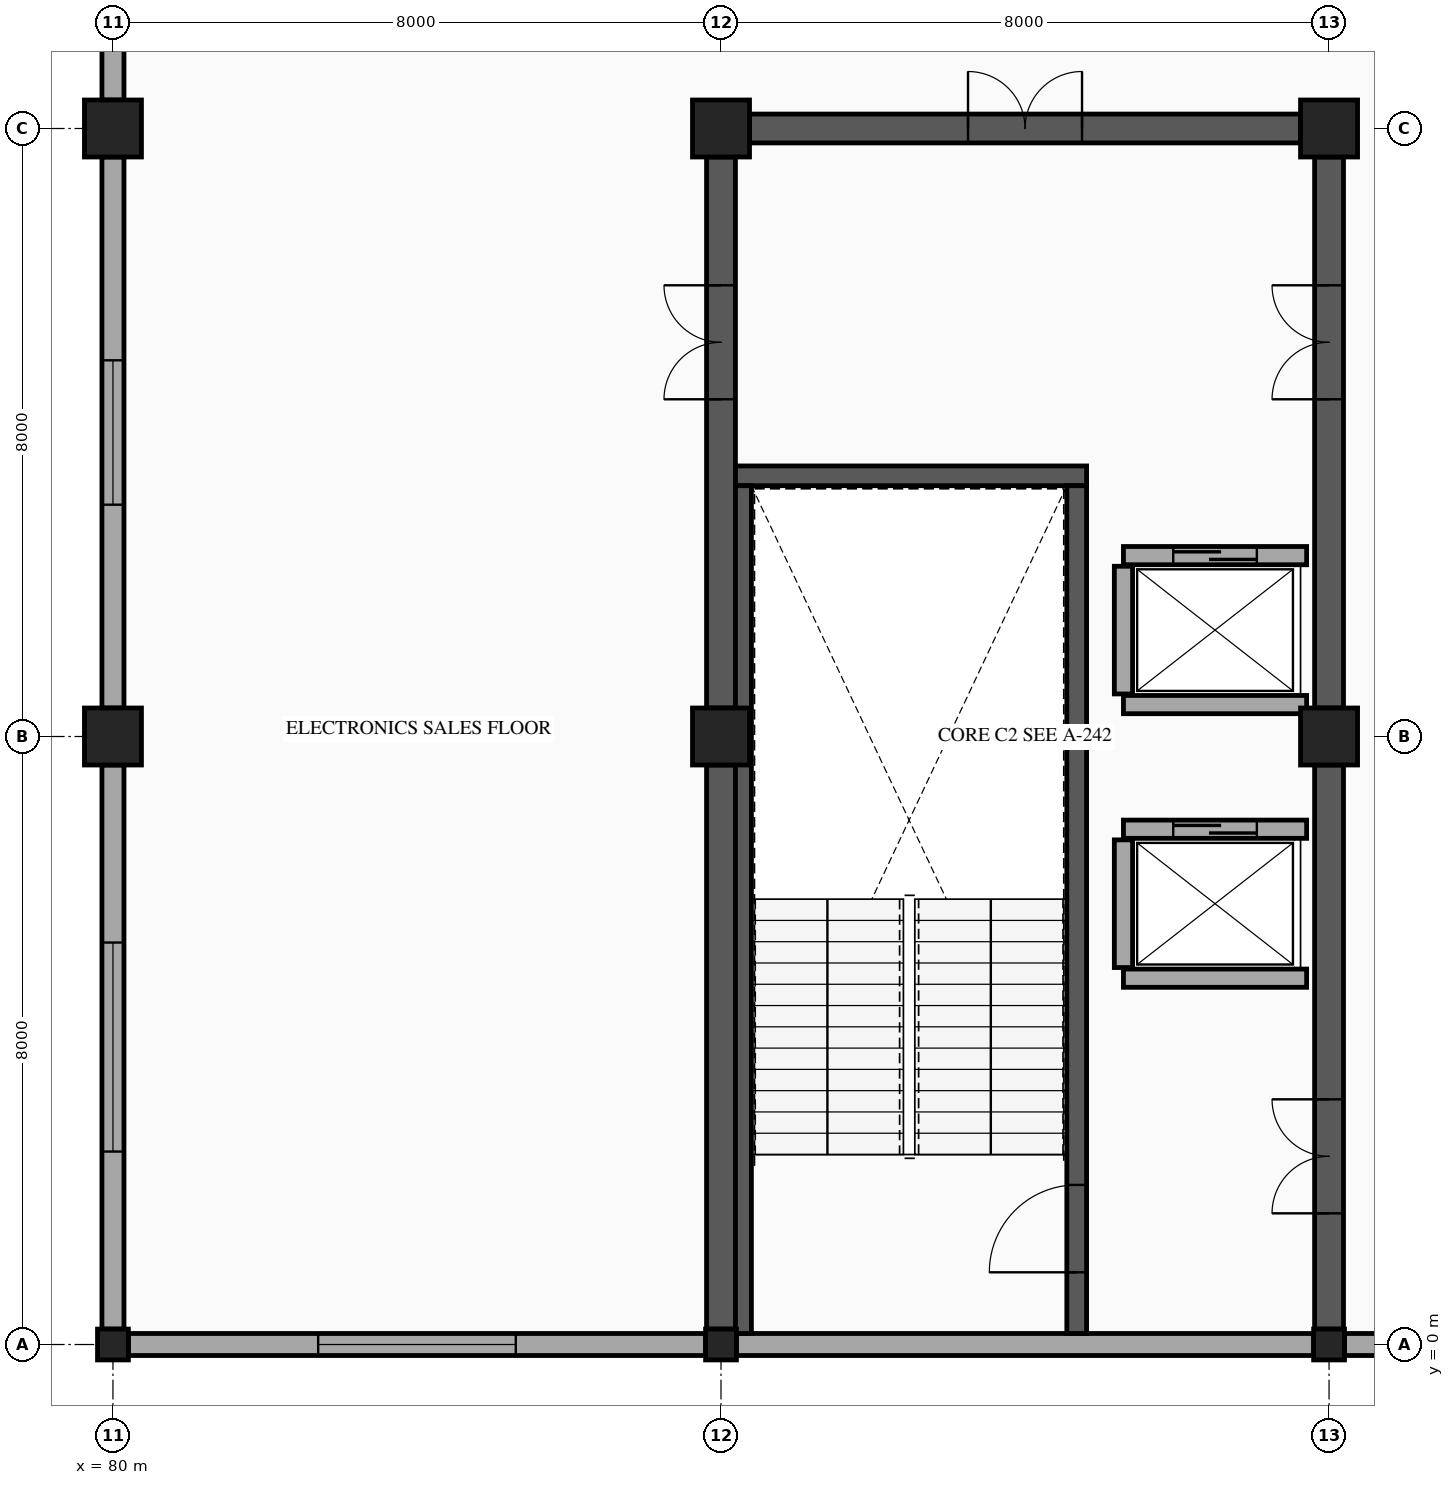
"""IFC4 building model, lengths in metres.
Left out: names, types, materials, properties, quantities, classifications, styles, units other than length and angle.
Written with IfcOpenShell. Run it as: python <this file> out.ifc"""

import sys

from ifc_helpers import new_model, si_unit, direction, frame, frame_2d, origin, origin_2d, place, context, subcontext, project, spatial, rectangle, hollow_rectangle, extrude, element, fill, save


model = new_model("IFC4")
c1 = context("Model", 3, precision=1e-05, world=origin(), true_north=direction((0.0, 1.0)))
c2 = subcontext(c1, "Body", "Model", "MODEL_VIEW")
j1 = project(units=[si_unit("LENGTHUNIT", "METRE"), si_unit("PLANEANGLEUNIT", "RADIAN")], contexts=[c1])
p1 = place(None, origin())
s1 = spatial("IfcSite", under=j1, at=p1, CompositionType="ELEMENT")
p2 = place(p1, origin())
s2 = spatial("IfcBuilding", under=s1, at=p2, CompositionType="ELEMENT")
p3 = place(p2, frame((0.0, 0.0, 23.9)))
s3 = spatial("IfcBuildingStorey", under=s2, at=p3, CompositionType="ELEMENT", Elevation=23.9)
p4 = place(p3, frame((80.0, 0.0, 0.0), z_axis=(0.0, 0.0, 1.0), x_axis=(1.0, 0.0, 0.0)))
e1 = element("IfcColumn", 1, at=p4, inside=s3, PredefinedType="COLUMN", context=c2, shape_type="SweptSolid", body=[
    extrude(hollow_rectangle(XDim=0.406, YDim=0.406, WallThickness=0.015, InnerFilletRadius=0.015, OuterFilletRadius=0.029, at=origin_2d()), origin(), (0.0, 0.0, 1.0), 4.5),
])
for number, where, z_axis, x_axis in (
    (2, (80.0, 8.0, 0.0), (0.0, 0.0, 1.0), (1.0, 0.0, 0.0)),
    (3, (80.0, 16.0, 0.0), (0.0, 0.0, 1.0), (1.0, 0.0, 0.0)),
):
    element("IfcColumn", number, at=place(p3, frame(where, z_axis=z_axis, x_axis=x_axis)), inside=s3, PredefinedType="COLUMN", context=c2, shape_type="SweptSolid", body=[
        extrude(rectangle(XDim=0.75, YDim=0.75, at=origin_2d()), origin(), (0.0, 0.0, 1.0), 4.5),
    ])
p5 = place(p3, frame((88.0, 0.0, 0.0), z_axis=(0.0, 0.0, 1.0), x_axis=(1.0, 0.0, 0.0)))
e4 = element("IfcColumn", 4, at=p5, inside=s3, PredefinedType="COLUMN", context=c2, shape_type="SweptSolid", body=[
    extrude(hollow_rectangle(XDim=0.406, YDim=0.406, WallThickness=0.015, InnerFilletRadius=0.015, OuterFilletRadius=0.029, at=origin_2d()), origin(), (0.0, 0.0, 1.0), 4.5),
])
for number, where, z_axis, x_axis in (
    (5, (88.0, 8.0, 0.0), (0.0, 0.0, 1.0), (1.0, 0.0, 0.0)),
    (6, (88.0, 16.0, 0.0), (0.0, 0.0, 1.0), (1.0, 0.0, 0.0)),
):
    element("IfcColumn", number, at=place(p3, frame(where, z_axis=z_axis, x_axis=x_axis)), inside=s3, PredefinedType="COLUMN", context=c2, shape_type="SweptSolid", body=[
        extrude(rectangle(XDim=0.75, YDim=0.75, at=origin_2d()), origin(), (0.0, 0.0, 1.0), 4.5),
    ])
p6 = place(p3, frame((96.0, 0.0, 0.0), z_axis=(0.0, 0.0, 1.0), x_axis=(1.0, 0.0, 0.0)))
e7 = element("IfcColumn", 7, at=p6, inside=s3, PredefinedType="COLUMN", context=c2, shape_type="SweptSolid", body=[
    extrude(hollow_rectangle(XDim=0.406, YDim=0.406, WallThickness=0.015, InnerFilletRadius=0.015, OuterFilletRadius=0.029, at=origin_2d()), origin(), (0.0, 0.0, 1.0), 4.5),
])
for number, where, z_axis, x_axis in (
    (8, (96.0, 8.0, 0.0), (0.0, 0.0, 1.0), (1.0, 0.0, 0.0)),
    (9, (96.0, 16.0, 0.0), (0.0, 0.0, 1.0), (1.0, 0.0, 0.0)),
):
    element("IfcColumn", number, at=place(p3, frame(where, z_axis=z_axis, x_axis=x_axis)), inside=s3, PredefinedType="COLUMN", context=c2, shape_type="SweptSolid", body=[
        extrude(rectangle(XDim=0.75, YDim=0.75, at=origin_2d()), origin(), (0.0, 0.0, 1.0), 4.5),
    ])
p7 = place(p3, frame((103.797, 0.0, 0.0), z_axis=(0.0, 0.0, 1.0), x_axis=(-1.0, 0.0, 0.0)))
e10 = element("IfcWall", 10, at=p7, inside=s3, PredefinedType="STANDARD", context=c2, shape_type="SweptSolid", body=[
    extrude(rectangle(XDim=7.594, YDim=0.29, at=frame_2d((3.797, 0.0))), origin(), (0.0, 0.0, 1.0), 3.48),
])
p8 = place(p7, frame((2.497, 0.0, 0.8)))
e11 = element("IfcOpeningElement", 11, at=p8, cuts=e10, PredefinedType="OPENING", context=c2, shape_type="SweptSolid", body=[
    extrude(rectangle(XDim=2.6, YDim=1.3, at=frame_2d((1.3, 0.65))), frame((0.0, 0.155, 0.0), z_axis=(0.0, -1.0, 0.0), x_axis=(1.0, 0.0, 0.0)), (0.0, 0.0, 1.0), 0.31),
])
p9 = place(p3, frame((95.797, 0.0, 0.0), z_axis=(0.0, 0.0, 1.0), x_axis=(-1.0, 0.0, 0.0)))
e12 = element("IfcWall", 12, at=p9, inside=s3, PredefinedType="STANDARD", context=c2, shape_type="SweptSolid", body=[
    extrude(rectangle(XDim=7.594, YDim=0.29, at=frame_2d((3.797, 0.0))), origin(), (0.0, 0.0, 1.0), 3.48),
])
p10 = place(p3, frame((87.797, 0.0, 0.0), z_axis=(0.0, 0.0, 1.0), x_axis=(-1.0, 0.0, 0.0)))
e13 = element("IfcWall", 13, at=p10, inside=s3, PredefinedType="STANDARD", context=c2, shape_type="SweptSolid", body=[
    extrude(rectangle(XDim=7.594, YDim=0.29, at=frame_2d((3.797, 0.0))), origin(), (0.0, 0.0, 1.0), 3.48),
])
p11 = place(p10, frame((2.497, 0.0, 0.8)))
e14 = element("IfcOpeningElement", 14, at=p11, cuts=e13, PredefinedType="OPENING", context=c2, shape_type="SweptSolid", body=[
    extrude(rectangle(XDim=2.6, YDim=1.3, at=frame_2d((1.3, 0.65))), frame((0.0, 0.155, 0.0), z_axis=(0.0, -1.0, 0.0), x_axis=(1.0, 0.0, 0.0)), (0.0, 0.0, 1.0), 0.31),
])
p12 = place(p3, frame((80.0, 0.203, 0.0), z_axis=(0.0, 0.0, 1.0), x_axis=(0.0, 1.0, 0.0)))
e15 = element("IfcWall", 15, at=p12, inside=s3, PredefinedType="STANDARD", context=c2, shape_type="SweptSolid", body=[
    extrude(rectangle(XDim=7.422, YDim=0.29, at=frame_2d((3.711, 0.0))), origin(), (0.0, 0.0, 1.0), 3.48),
])
p13 = place(p12, frame((2.336, 0.0, 0.8)))
e16 = element("IfcOpeningElement", 16, at=p13, cuts=e15, PredefinedType="OPENING", context=c2, shape_type="SweptSolid", body=[
    extrude(rectangle(XDim=2.75, YDim=2.15, at=frame_2d((1.375, 1.075))), frame((0.0, 0.155, 0.0), z_axis=(0.0, -1.0, 0.0), x_axis=(1.0, 0.0, 0.0)), (0.0, 0.0, 1.0), 0.31),
])
p14 = place(p3, frame((80.0, 8.375, 0.0), z_axis=(0.0, 0.0, 1.0), x_axis=(0.0, 1.0, 0.0)))
e17 = element("IfcWall", 17, at=p14, inside=s3, PredefinedType="STANDARD", context=c2, shape_type="SweptSolid", body=[
    extrude(rectangle(XDim=7.25, YDim=0.29, at=frame_2d((3.625, 0.0))), origin(), (0.0, 0.0, 1.0), 3.48),
])
p15 = place(p14, frame((2.675, 0.0, 0.8)))
e18 = element("IfcOpeningElement", 18, at=p15, cuts=e17, PredefinedType="OPENING", context=c2, shape_type="SweptSolid", body=[
    extrude(rectangle(XDim=1.9, YDim=1.65, at=frame_2d((0.95, 0.825))), frame((0.0, 0.155, 0.0), z_axis=(0.0, -1.0, 0.0), x_axis=(1.0, 0.0, 0.0)), (0.0, 0.0, 1.0), 0.31),
])
p16 = place(p3, frame((80.0, 16.375, 0.0), z_axis=(0.0, 0.0, 1.0), x_axis=(0.0, 1.0, 0.0)))
e19 = element("IfcWall", 19, at=p16, inside=s3, PredefinedType="STANDARD", context=c2, shape_type="SweptSolid", body=[
    extrude(rectangle(XDim=7.3, YDim=0.29, at=frame_2d((3.65, 0.0))), origin(), (0.0, 0.0, 1.0), 3.48),
])
p17 = place(p3, frame((88.14, 11.43, 0.0), z_axis=(0.0, 0.0, 1.0), x_axis=(1.0, 0.0, 0.0)))
e20 = element("IfcWall", 20, at=p17, inside=s3, PredefinedType="SHEAR", context=c2, shape_type="SweptSolid", body=[
    extrude(rectangle(XDim=4.67, YDim=0.26, at=frame_2d((2.335, 0.0))), origin(), (0.0, 0.0, 1.0), 4.28),
])
p18 = place(p3, frame((88.27, 0.145, 0.0), z_axis=(0.0, 0.0, 1.0), x_axis=(0.0, 1.0, 0.0)))
e21 = element("IfcWall", 21, at=p18, inside=s3, PredefinedType="SHEAR", context=c2, shape_type="SweptSolid", body=[
    extrude(rectangle(XDim=11.155, YDim=0.26, at=frame_2d((5.578, 0.0))), origin(), (0.0, 0.0, 1.0), 4.28),
])
p19 = place(p3, frame((92.68, 0.145, 0.0), z_axis=(0.0, 0.0, 1.0), x_axis=(0.0, 1.0, 0.0)))
e22 = element("IfcWall", 22, at=p19, inside=s3, PredefinedType="SHEAR", context=c2, shape_type="SweptSolid", body=[
    extrude(rectangle(XDim=11.155, YDim=0.26, at=frame_2d((5.578, 0.0))), origin(), (0.0, 0.0, 1.0), 4.28),
])
p20 = place(p19, frame((0.805, 0.0, 0.0)))
e23 = element("IfcOpeningElement", 23, at=p20, cuts=e22, PredefinedType="OPENING", context=c2, shape_type="SweptSolid", body=[
    extrude(rectangle(XDim=1.15, YDim=2.15, at=frame_2d((0.575, 1.075))), frame((0.0, 0.14, 0.0), z_axis=(0.0, -1.0, 0.0), x_axis=(1.0, 0.0, 0.0)), (0.0, 0.0, 1.0), 0.28),
])
p21 = place(p3, frame((88.375, 16.0, 0.0), z_axis=(0.0, 0.0, 1.0), x_axis=(1.0, 0.0, 0.0)))
e24 = element("IfcWall", 24, at=p21, inside=s3, PredefinedType="SHEAR", context=c2, shape_type="SweptSolid", body=[
    extrude(rectangle(XDim=7.25, YDim=0.38, at=frame_2d((3.625, 0.0))), origin(), (0.0, 0.0, 1.0), 4.28),
])
p22 = place(p21, frame((2.875, 0.0, 0.0)))
e25 = element("IfcOpeningElement", 25, at=p22, cuts=e24, PredefinedType="OPENING", context=c2, shape_type="SweptSolid", body=[
    extrude(rectangle(XDim=1.5, YDim=2.15, at=frame_2d((0.75, 1.075))), frame((0.0, 0.2, 0.0), z_axis=(0.0, -1.0, 0.0), x_axis=(1.0, 0.0, 0.0)), (0.0, 0.0, 1.0), 0.4),
])
p23 = place(p3, frame((88.0, 0.203, 0.0), z_axis=(0.0, 0.0, 1.0), x_axis=(0.0, 1.0, 0.0)))
e26 = element("IfcWall", 26, at=p23, inside=s3, PredefinedType="SHEAR", context=c2, shape_type="SweptSolid", body=[
    extrude(rectangle(XDim=7.422, YDim=0.38, at=frame_2d((3.711, 0.0))), origin(), (0.0, 0.0, 1.0), 4.28),
])
p24 = place(p3, frame((88.0, 8.375, 0.0), z_axis=(0.0, 0.0, 1.0), x_axis=(0.0, 1.0, 0.0)))
e27 = element("IfcWall", 27, at=p24, inside=s3, PredefinedType="SHEAR", context=c2, shape_type="SweptSolid", body=[
    extrude(rectangle(XDim=7.25, YDim=0.38, at=frame_2d((3.625, 0.0))), origin(), (0.0, 0.0, 1.0), 4.28),
])
p25 = place(p24, frame((4.062, 0.0, 0.0)))
e28 = element("IfcOpeningElement", 28, at=p25, cuts=e27, PredefinedType="OPENING", context=c2, shape_type="SweptSolid", body=[
    extrude(rectangle(XDim=1.5, YDim=2.15, at=frame_2d((0.75, 1.075))), frame((0.0, 0.2, 0.0), z_axis=(0.0, -1.0, 0.0), x_axis=(1.0, 0.0, 0.0)), (0.0, 0.0, 1.0), 0.4),
])
p26 = place(p3, frame((96.0, 0.203, 0.0), z_axis=(0.0, 0.0, 1.0), x_axis=(0.0, 1.0, 0.0)))
e29 = element("IfcWall", 29, at=p26, inside=s3, PredefinedType="SHEAR", context=c2, shape_type="SweptSolid", body=[
    extrude(rectangle(XDim=7.422, YDim=0.38, at=frame_2d((3.711, 0.0))), origin(), (0.0, 0.0, 1.0), 4.28),
])
p27 = place(p26, frame((1.523, 0.0, 0.0)))
e30 = element("IfcOpeningElement", 30, at=p27, cuts=e29, PredefinedType="OPENING", context=c2, shape_type="SweptSolid", body=[
    extrude(rectangle(XDim=1.5, YDim=2.15, at=frame_2d((0.75, 1.075))), frame((0.0, 0.2, 0.0), z_axis=(0.0, -1.0, 0.0), x_axis=(1.0, 0.0, 0.0)), (0.0, 0.0, 1.0), 0.4),
])
p28 = place(p3, frame((96.0, 8.375, 0.0), z_axis=(0.0, 0.0, 1.0), x_axis=(0.0, 1.0, 0.0)))
e31 = element("IfcWall", 31, at=p28, inside=s3, PredefinedType="SHEAR", context=c2, shape_type="SweptSolid", body=[
    extrude(rectangle(XDim=7.25, YDim=0.38, at=frame_2d((3.625, 0.0))), origin(), (0.0, 0.0, 1.0), 4.28),
])
p29 = place(p28, frame((4.062, 0.0, 0.0)))
e32 = element("IfcOpeningElement", 32, at=p29, cuts=e31, PredefinedType="OPENING", context=c2, shape_type="SweptSolid", body=[
    extrude(rectangle(XDim=1.5, YDim=2.15, at=frame_2d((0.75, 1.075))), frame((0.0, 0.2, 0.0), z_axis=(0.0, -1.0, 0.0), x_axis=(1.0, 0.0, 0.0)), (0.0, 0.0, 1.0), 0.4),
])
p30 = place(p3, frame((93.295, 6.78, 0.0), z_axis=(0.0, 0.0, 1.0), x_axis=(1.0, 0.0, 0.0)))
e33 = element("IfcWall", 33, at=p30, inside=s3, PredefinedType="PARTITIONING", context=c2, shape_type="SweptSolid", body=[
    extrude(rectangle(XDim=2.41, YDim=0.24, at=frame_2d((1.205, 0.0))), origin(), (0.0, 0.0, 1.0), 4.28),
])
p31 = place(p30, frame((0.655, 0.0, 0.0)))
e34 = element("IfcOpeningElement", 34, at=p31, cuts=e33, PredefinedType="OPENING", context=c2, shape_type="SweptSolid", body=[
    extrude(rectangle(XDim=1.1, YDim=2.15, at=frame_2d((0.55, 1.075))), frame((0.0, 0.13, 0.0), z_axis=(0.0, -1.0, 0.0), x_axis=(1.0, 0.0, 0.0)), (0.0, 0.0, 1.0), 0.26),
])
p32 = place(p3, frame((93.295, 4.82, 0.0), z_axis=(0.0, 0.0, 1.0), x_axis=(1.0, 0.0, 0.0)))
e35 = element("IfcWall", 35, at=p32, inside=s3, PredefinedType="PARTITIONING", context=c2, shape_type="SweptSolid", body=[
    extrude(rectangle(XDim=2.41, YDim=0.24, at=frame_2d((1.205, 0.0))), origin(), (0.0, 0.0, 1.0), 4.28),
])
p33 = place(p3, frame((93.295, 4.96, 0.0), z_axis=(0.0, 0.0, 1.0), x_axis=(0.0, 1.0, 0.0)))
e36 = element("IfcWall", 36, at=p33, inside=s3, PredefinedType="PARTITIONING", context=c2, shape_type="SweptSolid", body=[
    extrude(rectangle(XDim=1.68, YDim=0.24, at=frame_2d((0.84, 0.0))), origin(), (0.0, 0.0, 1.0), 4.28),
])
p34 = place(p3, frame((93.295, 10.38, 0.0), z_axis=(0.0, 0.0, 1.0), x_axis=(1.0, 0.0, 0.0)))
e37 = element("IfcWall", 37, at=p34, inside=s3, PredefinedType="PARTITIONING", context=c2, shape_type="SweptSolid", body=[
    extrude(rectangle(XDim=2.41, YDim=0.24, at=frame_2d((1.205, 0.0))), origin(), (0.0, 0.0, 1.0), 4.28),
])
p35 = place(p34, frame((0.655, 0.0, 0.0)))
e38 = element("IfcOpeningElement", 38, at=p35, cuts=e37, PredefinedType="OPENING", context=c2, shape_type="SweptSolid", body=[
    extrude(rectangle(XDim=1.1, YDim=2.15, at=frame_2d((0.55, 1.075))), frame((0.0, 0.13, 0.0), z_axis=(0.0, -1.0, 0.0), x_axis=(1.0, 0.0, 0.0)), (0.0, 0.0, 1.0), 0.26),
])
p36 = place(p3, frame((93.295, 8.42, 0.0), z_axis=(0.0, 0.0, 1.0), x_axis=(1.0, 0.0, 0.0)))
e39 = element("IfcWall", 39, at=p36, inside=s3, PredefinedType="PARTITIONING", context=c2, shape_type="SweptSolid", body=[
    extrude(rectangle(XDim=2.41, YDim=0.24, at=frame_2d((1.205, 0.0))), origin(), (0.0, 0.0, 1.0), 4.28),
])
p37 = place(p3, frame((93.295, 8.56, 0.0), z_axis=(0.0, 0.0, 1.0), x_axis=(0.0, 1.0, 0.0)))
e40 = element("IfcWall", 40, at=p37, inside=s3, PredefinedType="PARTITIONING", context=c2, shape_type="SweptSolid", body=[
    extrude(rectangle(XDim=1.68, YDim=0.24, at=frame_2d((0.84, 0.0))), origin(), (0.0, 0.0, 1.0), 4.28),
])
p38 = place(p11, origin())
e41 = element("IfcWindow", 41, at=p38, inside=s3, PartitioningType="DOUBLE_PANEL_VERTICAL", PredefinedType="WINDOW", context=c2, shape_type="SweptSolid", body=[
    extrude(rectangle(XDim=2.6, YDim=1.3, at=frame_2d((1.3, 0.65))), frame((0.0, 0.03, 0.0), z_axis=(0.0, -1.0, 0.0), x_axis=(1.0, 0.0, 0.0)), (0.0, 0.0, 1.0), 0.06),
])
fill(e14, e41)
p39 = place(p13, origin())
e42 = element("IfcWindow", 42, at=p39, inside=s3, PartitioningType="TRIPLE_PANEL_VERTICAL", PredefinedType="WINDOW", context=c2, shape_type="SweptSolid", body=[
    extrude(rectangle(XDim=2.75, YDim=2.15, at=frame_2d((1.375, 1.075))), frame((0.0, 0.03, 0.0), z_axis=(0.0, -1.0, 0.0), x_axis=(1.0, 0.0, 0.0)), (0.0, 0.0, 1.0), 0.06),
])
fill(e16, e42)
p40 = place(p15, origin())
e43 = element("IfcWindow", 43, at=p40, inside=s3, PartitioningType="DOUBLE_PANEL_VERTICAL", PredefinedType="WINDOW", context=c2, shape_type="SweptSolid", body=[
    extrude(rectangle(XDim=1.9, YDim=1.65, at=frame_2d((0.95, 0.825))), frame((0.0, 0.03, 0.0), z_axis=(0.0, -1.0, 0.0), x_axis=(1.0, 0.0, 0.0)), (0.0, 0.0, 1.0), 0.06),
])
fill(e18, e43)
p41 = place(p20, origin())
e44 = element("IfcDoor", 44, at=p41, inside=s3, OperationType="SINGLE_SWING_LEFT", PredefinedType="DOOR", context=c2, shape_type="SweptSolid", body=[
    extrude(rectangle(XDim=1.15, YDim=2.15, at=frame_2d((0.575, 1.075))), frame((0.0, 0.025, 0.0), z_axis=(0.0, -1.0, 0.0), x_axis=(1.0, 0.0, 0.0)), (0.0, 0.0, 1.0), 0.05),
])
fill(e23, e44)
p42 = place(p22, origin())
e45 = element("IfcDoor", 45, at=p42, inside=s3, OperationType="DOUBLE_DOOR_SINGLE_SWING", PredefinedType="DOOR", context=c2, shape_type="SweptSolid", body=[
    extrude(rectangle(XDim=1.5, YDim=2.15, at=frame_2d((0.75, 1.075))), frame((0.0, 0.025, 0.0), z_axis=(0.0, -1.0, 0.0), x_axis=(1.0, 0.0, 0.0)), (0.0, 0.0, 1.0), 0.05),
])
fill(e25, e45)
p43 = place(p25, origin())
e46 = element("IfcDoor", 46, at=p43, inside=s3, OperationType="DOUBLE_DOOR_SINGLE_SWING", PredefinedType="DOOR", context=c2, shape_type="SweptSolid", body=[
    extrude(rectangle(XDim=1.5, YDim=2.15, at=frame_2d((0.75, 1.075))), frame((0.0, 0.025, 0.0), z_axis=(0.0, -1.0, 0.0), x_axis=(1.0, 0.0, 0.0)), (0.0, 0.0, 1.0), 0.05),
])
fill(e28, e46)
p44 = place(p27, origin())
e47 = element("IfcDoor", 47, at=p44, inside=s3, OperationType="DOUBLE_DOOR_SINGLE_SWING", PredefinedType="DOOR", context=c2, shape_type="SweptSolid", body=[
    extrude(rectangle(XDim=1.5, YDim=2.15, at=frame_2d((0.75, 1.075))), frame((0.0, 0.025, 0.0), z_axis=(0.0, -1.0, 0.0), x_axis=(1.0, 0.0, 0.0)), (0.0, 0.0, 1.0), 0.05),
])
fill(e30, e47)
p45 = place(p29, origin())
e48 = element("IfcDoor", 48, at=p45, inside=s3, OperationType="DOUBLE_DOOR_SINGLE_SWING", PredefinedType="DOOR", context=c2, shape_type="SweptSolid", body=[
    extrude(rectangle(XDim=1.5, YDim=2.15, at=frame_2d((0.75, 1.075))), frame((0.0, 0.025, 0.0), z_axis=(0.0, -1.0, 0.0), x_axis=(1.0, 0.0, 0.0)), (0.0, 0.0, 1.0), 0.05),
])
fill(e32, e48)
p46 = place(p31, origin())
e49 = element("IfcDoor", 49, at=p46, inside=s3, OperationType="SLIDING_TO_LEFT", PredefinedType="DOOR", context=c2, shape_type="SweptSolid", body=[
    extrude(rectangle(XDim=1.1, YDim=2.15, at=frame_2d((0.55, 1.075))), frame((0.0, 0.025, 0.0), z_axis=(0.0, -1.0, 0.0), x_axis=(1.0, 0.0, 0.0)), (0.0, 0.0, 1.0), 0.05),
])
fill(e34, e49)
p47 = place(p35, origin())
e50 = element("IfcDoor", 50, at=p47, inside=s3, OperationType="SLIDING_TO_LEFT", PredefinedType="DOOR", context=c2, shape_type="SweptSolid", body=[
    extrude(rectangle(XDim=1.1, YDim=2.15, at=frame_2d((0.55, 1.075))), frame((0.0, 0.025, 0.0), z_axis=(0.0, -1.0, 0.0), x_axis=(1.0, 0.0, 0.0)), (0.0, 0.0, 1.0), 0.05),
])
fill(e38, e50)
save(model, sys.argv[1])
